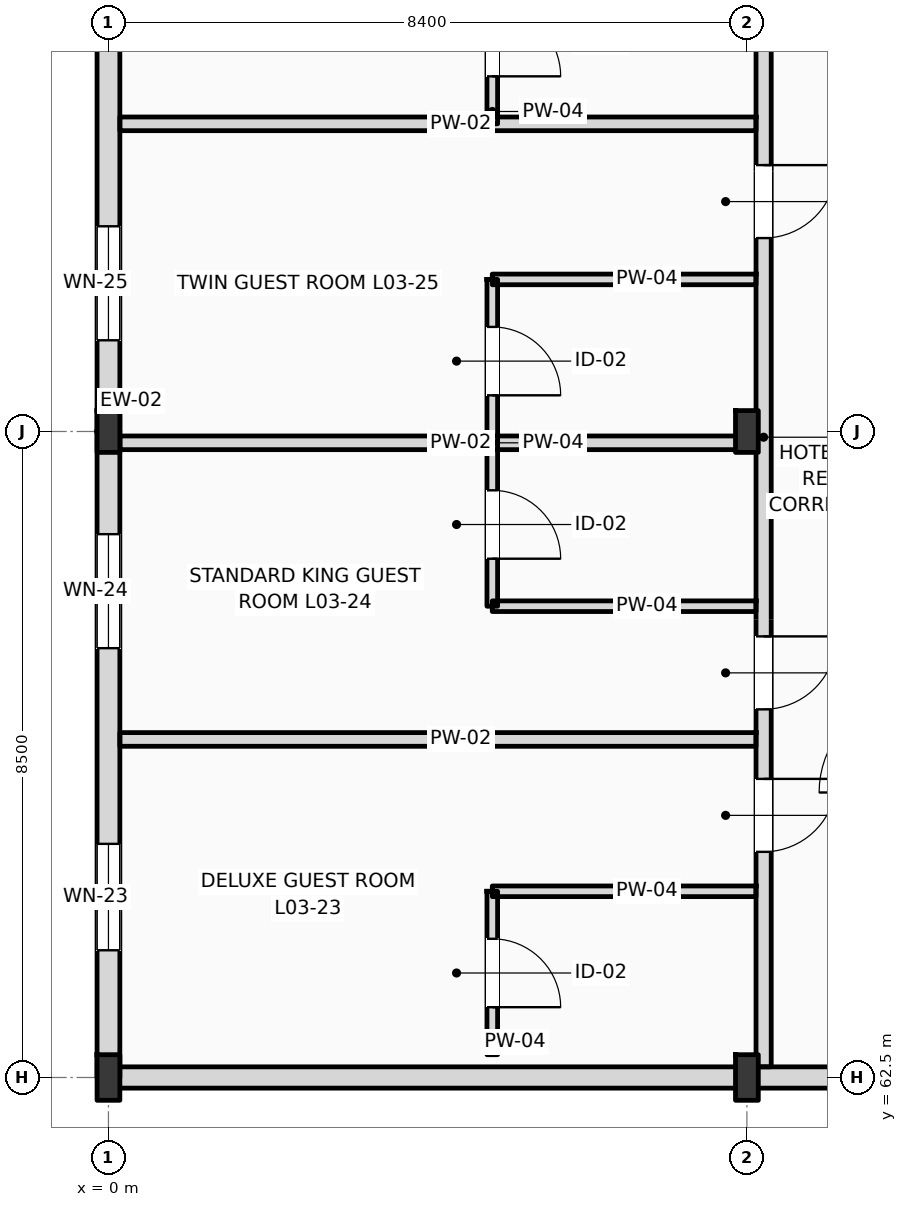
"""IFC4 building model, lengths in metres.
Left out: names, types, materials, properties, quantities, classifications, styles, units other than length and angle.
Written with IfcOpenShell. Run it as: python <this file> out.ifc"""

import sys

from ifc_helpers import new_model, si_unit, direction, frame, frame_2d, origin, origin_2d, place, context, subcontext, project, spatial, rectangle, i_section, extrude, element, fill, save


model = new_model("IFC4")
c1 = context("Model", 3, precision=1e-05, world=origin(), true_north=direction((0.0, 1.0)))
c2 = subcontext(c1, "Body", "Model", "MODEL_VIEW")
j1 = project(units=[si_unit("LENGTHUNIT", "METRE"), si_unit("PLANEANGLEUNIT", "RADIAN")], contexts=[c1])
p1 = place(None, origin())
s1 = spatial("IfcSite", under=j1, at=p1, CompositionType="ELEMENT")
p2 = place(p1, origin())
s2 = spatial("IfcBuilding", under=s1, at=p2, CompositionType="ELEMENT")
p3 = place(p2, frame((0.0, 0.0, 16.2)))
s3 = spatial("IfcBuildingStorey", under=s2, at=p3, CompositionType="ELEMENT", Elevation=16.2)
p4 = place(p3, frame((0.0, 62.5, 0.0), z_axis=(0.0, 0.0, 1.0), x_axis=(1.0, 0.0, 0.0)))
e1 = element("IfcColumn", 1, at=p4, inside=s3, PredefinedType="COLUMN", context=c2, shape_type="SweptSolid", body=[
    extrude(i_section(OverallWidth=0.3, OverallDepth=0.6, WebThickness=0.015, FlangeThickness=0.03, FilletRadius=0.027, at=origin_2d()), origin(), (0.0, 0.0, 1.0), 4.2),
])
p5 = place(p3, frame((0.0, 71.0, 0.0), z_axis=(0.0, 0.0, 1.0), x_axis=(1.0, 0.0, 0.0)))
e2 = element("IfcColumn", 2, at=p5, inside=s3, PredefinedType="COLUMN", context=c2, shape_type="SweptSolid", body=[
    extrude(i_section(OverallWidth=0.3, OverallDepth=0.55, WebThickness=0.015, FlangeThickness=0.029, FilletRadius=0.027, at=origin_2d()), origin(), (0.0, 0.0, 1.0), 4.2),
])
p6 = place(p3, frame((8.4, 62.5, 0.0), z_axis=(0.0, 0.0, 1.0), x_axis=(1.0, 0.0, 0.0)))
e3 = element("IfcColumn", 3, at=p6, inside=s3, PredefinedType="COLUMN", context=c2, shape_type="SweptSolid", body=[
    extrude(i_section(OverallWidth=0.3, OverallDepth=0.6, WebThickness=0.015, FlangeThickness=0.03, FilletRadius=0.027, at=origin_2d()), origin(), (0.0, 0.0, 1.0), 4.2),
])
p7 = place(p3, frame((8.4, 71.0, 0.0), z_axis=(0.0, 0.0, 1.0), x_axis=(1.0, 0.0, 0.0)))
e4 = element("IfcColumn", 4, at=p7, inside=s3, PredefinedType="COLUMN", context=c2, shape_type="SweptSolid", body=[
    extrude(i_section(OverallWidth=0.3, OverallDepth=0.55, WebThickness=0.015, FlangeThickness=0.029, FilletRadius=0.027, at=origin_2d()), origin(), (0.0, 0.0, 1.0), 4.2),
])
p8 = place(p3, frame((0.0, 62.5, 0.0), z_axis=(0.0, 0.0, 1.0), x_axis=(0.0, 1.0, 0.0)))
e5 = element("IfcWall", 5, at=p8, inside=s3, PredefinedType="STANDARD", context=c2, shape_type="SweptSolid", body=[
    extrude(rectangle(XDim=8.5, YDim=0.3, at=frame_2d((4.25, 0.0))), origin(), (0.0, 0.0, 1.0), 3.51),
])
p9 = place(p8, frame((1.674, 0.0, 0.9)))
e6 = element("IfcOpeningElement", 6, at=p9, cuts=e5, PredefinedType="OPENING", context=c2, shape_type="SweptSolid", body=[
    extrude(rectangle(XDim=1.4, YDim=1.7, at=frame_2d((0.7, 0.85))), frame((0.0, 0.16, 0.0), z_axis=(0.0, -1.0, 0.0), x_axis=(1.0, 0.0, 0.0)), (0.0, 0.0, 1.0), 0.32),
])
p10 = place(p8, frame((5.649, 0.0, 0.9)))
e7 = element("IfcOpeningElement", 7, at=p10, cuts=e5, PredefinedType="OPENING", context=c2, shape_type="SweptSolid", body=[
    extrude(rectangle(XDim=1.5, YDim=1.75, at=frame_2d((0.75, 0.875))), frame((0.0, 0.16, 0.0), z_axis=(0.0, -1.0, 0.0), x_axis=(1.0, 0.0, 0.0)), (0.0, 0.0, 1.0), 0.32),
])
p11 = place(p3, frame((0.0, 71.0, 0.0), z_axis=(0.0, 0.0, 1.0), x_axis=(0.0, 1.0, 0.0)))
e8 = element("IfcWall", 8, at=p11, inside=s3, PredefinedType="STANDARD", context=c2, shape_type="SweptSolid", body=[
    extrude(rectangle(XDim=8.5, YDim=0.3, at=frame_2d((4.25, 0.0))), origin(), (0.0, 0.0, 1.0), 3.51),
])
p12 = place(p11, frame((1.2, 0.0, 0.9)))
e9 = element("IfcOpeningElement", 9, at=p12, cuts=e8, PredefinedType="OPENING", context=c2, shape_type="SweptSolid", body=[
    extrude(rectangle(XDim=1.5, YDim=2.3, at=frame_2d((0.75, 1.15))), frame((0.0, 0.16, 0.0), z_axis=(0.0, -1.0, 0.0), x_axis=(1.0, 0.0, 0.0)), (0.0, 0.0, 1.0), 0.32),
])
p13 = place(p11, frame((5.25, 0.0, 0.9)))
e10 = element("IfcOpeningElement", 10, at=p13, cuts=e8, PredefinedType="OPENING", context=c2, shape_type="SweptSolid", body=[
    extrude(rectangle(XDim=1.5, YDim=2.43, at=frame_2d((0.75, 1.215))), frame((0.0, 0.16, 0.0), z_axis=(0.0, -1.0, 0.0), x_axis=(1.0, 0.0, 0.0)), (0.0, 0.0, 1.0), 0.32),
])
p14 = place(p3, frame((0.0, 62.5, 0.0), z_axis=(0.0, 0.0, 1.0), x_axis=(1.0, 0.0, 0.0)))
e11 = element("IfcWall", 11, at=p14, inside=s3, PredefinedType="STANDARD", context=c2, shape_type="SweptSolid", body=[
    extrude(rectangle(XDim=25.2, YDim=0.28, at=frame_2d((12.6, 0.0))), origin(), (0.0, 0.0, 1.0), 3.36),
])
p15 = place(p3, frame((8.62, 62.64, 0.0), z_axis=(0.0, 0.0, 1.0), x_axis=(0.0, 1.0, 0.0)))
e12 = element("IfcWall", 12, at=p15, inside=s3, PredefinedType="PARTITIONING", context=c2, shape_type="SweptSolid", body=[
    extrude(rectangle(XDim=32.66, YDim=0.2, at=frame_2d((16.33, 0.0))), origin(), (0.0, 0.0, 1.0), 3.51),
])
p16 = place(p15, frame((2.829, 0.0, 0.0)))
e13 = element("IfcOpeningElement", 13, at=p16, cuts=e12, PredefinedType="OPENING", context=c2, shape_type="SweptSolid", body=[
    extrude(rectangle(XDim=0.96, YDim=2.2, at=frame_2d((0.48, 1.1))), frame((0.0, 0.11, 0.0), z_axis=(0.0, -1.0, 0.0), x_axis=(1.0, 0.0, 0.0)), (0.0, 0.0, 1.0), 0.22),
])
p17 = place(p15, frame((4.704, 0.0, 0.0)))
e14 = element("IfcOpeningElement", 14, at=p17, cuts=e12, PredefinedType="OPENING", context=c2, shape_type="SweptSolid", body=[
    extrude(rectangle(XDim=0.96, YDim=2.2, at=frame_2d((0.48, 1.1))), frame((0.0, 0.11, 0.0), z_axis=(0.0, -1.0, 0.0), x_axis=(1.0, 0.0, 0.0)), (0.0, 0.0, 1.0), 0.22),
])
p18 = place(p15, frame((10.905, 0.0, 0.0)))
e15 = element("IfcOpeningElement", 15, at=p18, cuts=e12, PredefinedType="OPENING", context=c2, shape_type="SweptSolid", body=[
    extrude(rectangle(XDim=0.96, YDim=2.2, at=frame_2d((0.48, 1.1))), frame((0.0, 0.11, 0.0), z_axis=(0.0, -1.0, 0.0), x_axis=(1.0, 0.0, 0.0)), (0.0, 0.0, 1.0), 0.22),
])
p19 = place(p15, frame((14.954, 0.0, 0.0)))
e16 = element("IfcOpeningElement", 16, at=p19, cuts=e12, PredefinedType="OPENING", context=c2, shape_type="SweptSolid", body=[
    extrude(rectangle(XDim=0.96, YDim=2.2, at=frame_2d((0.48, 1.1))), frame((0.0, 0.11, 0.0), z_axis=(0.0, -1.0, 0.0), x_axis=(1.0, 0.0, 0.0)), (0.0, 0.0, 1.0), 0.22),
])
p20 = place(p15, frame((19.004, 0.0, 0.0)))
e17 = element("IfcOpeningElement", 17, at=p20, cuts=e12, PredefinedType="OPENING", context=c2, shape_type="SweptSolid", body=[
    extrude(rectangle(XDim=0.96, YDim=2.2, at=frame_2d((0.48, 1.1))), frame((0.0, 0.11, 0.0), z_axis=(0.0, -1.0, 0.0), x_axis=(1.0, 0.0, 0.0)), (0.0, 0.0, 1.0), 0.22),
])
p21 = place(p15, frame((23.055, 0.0, 0.0)))
e18 = element("IfcOpeningElement", 18, at=p21, cuts=e12, PredefinedType="OPENING", context=c2, shape_type="SweptSolid", body=[
    extrude(rectangle(XDim=0.96, YDim=2.2, at=frame_2d((0.48, 1.1))), frame((0.0, 0.11, 0.0), z_axis=(0.0, -1.0, 0.0), x_axis=(1.0, 0.0, 0.0)), (0.0, 0.0, 1.0), 0.22),
])
p22 = place(p15, frame((27.104, 0.0, 0.0)))
e19 = element("IfcOpeningElement", 19, at=p22, cuts=e12, PredefinedType="OPENING", context=c2, shape_type="SweptSolid", body=[
    extrude(rectangle(XDim=0.96, YDim=2.2, at=frame_2d((0.48, 1.1))), frame((0.0, 0.11, 0.0), z_axis=(0.0, -1.0, 0.0), x_axis=(1.0, 0.0, 0.0)), (0.0, 0.0, 1.0), 0.22),
])
p23 = place(p15, frame((31.179, 0.0, 0.0)))
e20 = element("IfcOpeningElement", 20, at=p23, cuts=e12, PredefinedType="OPENING", context=c2, shape_type="SweptSolid", body=[
    extrude(rectangle(XDim=0.96, YDim=2.2, at=frame_2d((0.48, 1.1))), frame((0.0, 0.11, 0.0), z_axis=(0.0, -1.0, 0.0), x_axis=(1.0, 0.0, 0.0)), (0.0, 0.0, 1.0), 0.22),
])
p24 = place(p3, frame((0.15, 66.948, 0.0), z_axis=(0.0, 0.0, 1.0), x_axis=(1.0, 0.0, 0.0)))
e21 = element("IfcWall", 21, at=p24, inside=s3, PredefinedType="PARTITIONING", context=c2, shape_type="SweptSolid", body=[
    extrude(rectangle(XDim=8.37, YDim=0.18, at=frame_2d((4.185, 0.0))), origin(), (0.0, 0.0, 1.0), 3.92),
])
p25 = place(p3, frame((5.05, 64.95, 0.0), z_axis=(0.0, 0.0, 1.0), x_axis=(1.0, 0.0, 0.0)))
e22 = element("IfcWall", 22, at=p25, inside=s3, PredefinedType="PARTITIONING", context=c2, shape_type="SweptSolid", body=[
    extrude(rectangle(XDim=3.47, YDim=0.14, at=frame_2d((1.735, 0.0))), origin(), (0.0, 0.0, 1.0), 3.92),
])
p26 = place(p3, frame((5.05, 62.8, 0.0), z_axis=(0.0, 0.0, 1.0), x_axis=(0.0, 1.0, 0.0)))
e23 = element("IfcWall", 23, at=p26, inside=s3, PredefinedType="PARTITIONING", context=c2, shape_type="SweptSolid", body=[
    extrude(rectangle(XDim=2.15, YDim=0.14, at=frame_2d((1.075, 0.0))), origin(), (0.0, 0.0, 1.0), 3.92),
])
p27 = place(p26, frame((0.625, 0.0, 0.0)))
e24 = element("IfcOpeningElement", 24, at=p27, cuts=e23, PredefinedType="OPENING", context=c2, shape_type="SweptSolid", body=[
    extrude(rectangle(XDim=0.9, YDim=2.1, at=frame_2d((0.45, 1.05))), frame((0.0, 0.08, 0.0), z_axis=(0.0, -1.0, 0.0), x_axis=(1.0, 0.0, 0.0)), (0.0, 0.0, 1.0), 0.16),
])
p28 = place(p3, frame((0.15, 70.851, 0.0), z_axis=(0.0, 0.0, 1.0), x_axis=(1.0, 0.0, 0.0)))
e25 = element("IfcWall", 25, at=p28, inside=s3, PredefinedType="PARTITIONING", context=c2, shape_type="SweptSolid", body=[
    extrude(rectangle(XDim=8.37, YDim=0.18, at=frame_2d((4.185, 0.0))), origin(), (0.0, 0.0, 1.0), 3.36),
])
p29 = place(p3, frame((5.05, 68.701, 0.0), z_axis=(0.0, 0.0, 1.0), x_axis=(1.0, 0.0, 0.0)))
e26 = element("IfcWall", 26, at=p29, inside=s3, PredefinedType="PARTITIONING", context=c2, shape_type="SweptSolid", body=[
    extrude(rectangle(XDim=3.47, YDim=0.14, at=frame_2d((1.735, 0.0))), origin(), (0.0, 0.0, 1.0), 3.92),
])
p30 = place(p3, frame((5.05, 68.701, 0.0), z_axis=(0.0, 0.0, 1.0), x_axis=(0.0, 1.0, 0.0)))
e27 = element("IfcWall", 27, at=p30, inside=s3, PredefinedType="PARTITIONING", context=c2, shape_type="SweptSolid", body=[
    extrude(rectangle(XDim=2.15, YDim=0.14, at=frame_2d((1.075, 0.0))), origin(), (0.0, 0.0, 1.0), 3.92),
])
p31 = place(p30, frame((0.625, 0.0, 0.0)))
e28 = element("IfcOpeningElement", 28, at=p31, cuts=e27, PredefinedType="OPENING", context=c2, shape_type="SweptSolid", body=[
    extrude(rectangle(XDim=0.9, YDim=2.1, at=frame_2d((0.45, 1.05))), frame((0.0, 0.08, 0.0), z_axis=(0.0, -1.0, 0.0), x_axis=(1.0, 0.0, 0.0)), (0.0, 0.0, 1.0), 0.16),
])
p32 = place(p3, frame((0.15, 75.048, 0.0), z_axis=(0.0, 0.0, 1.0), x_axis=(1.0, 0.0, 0.0)))
e29 = element("IfcWall", 29, at=p32, inside=s3, PredefinedType="PARTITIONING", context=c2, shape_type="SweptSolid", body=[
    extrude(rectangle(XDim=8.37, YDim=0.18, at=frame_2d((4.185, 0.0))), origin(), (0.0, 0.0, 1.0), 3.92),
])
p33 = place(p3, frame((5.05, 73.001, 0.0), z_axis=(0.0, 0.0, 1.0), x_axis=(1.0, 0.0, 0.0)))
e30 = element("IfcWall", 30, at=p33, inside=s3, PredefinedType="PARTITIONING", context=c2, shape_type="SweptSolid", body=[
    extrude(rectangle(XDim=3.47, YDim=0.14, at=frame_2d((1.735, 0.0))), origin(), (0.0, 0.0, 1.0), 3.92),
])
p34 = place(p3, frame((5.05, 70.851, 0.0), z_axis=(0.0, 0.0, 1.0), x_axis=(0.0, 1.0, 0.0)))
e31 = element("IfcWall", 31, at=p34, inside=s3, PredefinedType="PARTITIONING", context=c2, shape_type="SweptSolid", body=[
    extrude(rectangle(XDim=2.15, YDim=0.14, at=frame_2d((1.075, 0.0))), origin(), (0.0, 0.0, 1.0), 3.92),
])
p35 = place(p34, frame((0.625, 0.0, 0.0)))
e32 = element("IfcOpeningElement", 32, at=p35, cuts=e31, PredefinedType="OPENING", context=c2, shape_type="SweptSolid", body=[
    extrude(rectangle(XDim=0.9, YDim=2.1, at=frame_2d((0.45, 1.05))), frame((0.0, 0.08, 0.0), z_axis=(0.0, -1.0, 0.0), x_axis=(1.0, 0.0, 0.0)), (0.0, 0.0, 1.0), 0.16),
])
p36 = place(p3, frame((5.05, 75.048, 0.0), z_axis=(0.0, 0.0, 1.0), x_axis=(0.0, 1.0, 0.0)))
e33 = element("IfcWall", 33, at=p36, inside=s3, PredefinedType="PARTITIONING", context=c2, shape_type="SweptSolid", body=[
    extrude(rectangle(XDim=2.15, YDim=0.14, at=frame_2d((1.075, 0.0))), origin(), (0.0, 0.0, 1.0), 3.92),
])
p37 = place(p36, frame((0.625, 0.0, 0.0)))
e34 = element("IfcOpeningElement", 34, at=p37, cuts=e33, PredefinedType="OPENING", context=c2, shape_type="SweptSolid", body=[
    extrude(rectangle(XDim=0.9, YDim=2.1, at=frame_2d((0.45, 1.05))), frame((0.0, 0.08, 0.0), z_axis=(0.0, -1.0, 0.0), x_axis=(1.0, 0.0, 0.0)), (0.0, 0.0, 1.0), 0.16),
])
p38 = place(p9, origin())
e35 = element("IfcWindow", 35, at=p38, inside=s3, PartitioningType="DOUBLE_PANEL_VERTICAL", PredefinedType="WINDOW", context=c2, shape_type="SweptSolid", body=[
    extrude(rectangle(XDim=1.4, YDim=1.7, at=frame_2d((0.7, 0.85))), frame((0.0, 0.03, 0.0), z_axis=(0.0, -1.0, 0.0), x_axis=(1.0, 0.0, 0.0)), (0.0, 0.0, 1.0), 0.06),
])
fill(e6, e35)
p39 = place(p10, origin())
e36 = element("IfcWindow", 36, at=p39, inside=s3, PartitioningType="DOUBLE_PANEL_VERTICAL", PredefinedType="WINDOW", context=c2, shape_type="SweptSolid", body=[
    extrude(rectangle(XDim=1.5, YDim=1.75, at=frame_2d((0.75, 0.875))), frame((0.0, 0.03, 0.0), z_axis=(0.0, -1.0, 0.0), x_axis=(1.0, 0.0, 0.0)), (0.0, 0.0, 1.0), 0.06),
])
fill(e7, e36)
p40 = place(p12, origin())
e37 = element("IfcWindow", 37, at=p40, inside=s3, PartitioningType="DOUBLE_PANEL_VERTICAL", PredefinedType="WINDOW", context=c2, shape_type="SweptSolid", body=[
    extrude(rectangle(XDim=1.5, YDim=2.3, at=frame_2d((0.75, 1.15))), frame((0.0, 0.03, 0.0), z_axis=(0.0, -1.0, 0.0), x_axis=(1.0, 0.0, 0.0)), (0.0, 0.0, 1.0), 0.06),
])
fill(e9, e37)
p41 = place(p16, frame((0.96, 0.0, 0.0), z_axis=(0.0, 0.0, 1.0), x_axis=(-1.0, 0.0, 0.0)))
e38 = element("IfcDoor", 38, at=p41, inside=s3, OperationType="SINGLE_SWING_RIGHT", PredefinedType="DOOR", context=c2, shape_type="SweptSolid", body=[
    extrude(rectangle(XDim=0.96, YDim=2.2, at=frame_2d((0.48, 1.1))), frame((0.0, 0.025, 0.0), z_axis=(0.0, -1.0, 0.0), x_axis=(1.0, 0.0, 0.0)), (0.0, 0.0, 1.0), 0.05),
])
fill(e13, e38)
p42 = place(p27, frame((0.9, 0.0, 0.0), z_axis=(0.0, 0.0, 1.0), x_axis=(-1.0, 0.0, 0.0)))
e39 = element("IfcDoor", 39, at=p42, inside=s3, OperationType="SINGLE_SWING_LEFT", PredefinedType="DOOR", context=c2, shape_type="SweptSolid", body=[
    extrude(rectangle(XDim=0.9, YDim=2.1, at=frame_2d((0.45, 1.05))), frame((0.0, 0.025, 0.0), z_axis=(0.0, -1.0, 0.0), x_axis=(1.0, 0.0, 0.0)), (0.0, 0.0, 1.0), 0.05),
])
fill(e24, e39)
p43 = place(p17, frame((0.96, 0.0, 0.0), z_axis=(0.0, 0.0, 1.0), x_axis=(-1.0, 0.0, 0.0)))
e40 = element("IfcDoor", 40, at=p43, inside=s3, OperationType="SINGLE_SWING_RIGHT", PredefinedType="DOOR", context=c2, shape_type="SweptSolid", body=[
    extrude(rectangle(XDim=0.96, YDim=2.2, at=frame_2d((0.48, 1.1))), frame((0.0, 0.025, 0.0), z_axis=(0.0, -1.0, 0.0), x_axis=(1.0, 0.0, 0.0)), (0.0, 0.0, 1.0), 0.05),
])
fill(e14, e40)
p44 = place(p31, frame((0.9, 0.0, 0.0), z_axis=(0.0, 0.0, 1.0), x_axis=(-1.0, 0.0, 0.0)))
e41 = element("IfcDoor", 41, at=p44, inside=s3, OperationType="SINGLE_SWING_LEFT", PredefinedType="DOOR", context=c2, shape_type="SweptSolid", body=[
    extrude(rectangle(XDim=0.9, YDim=2.1, at=frame_2d((0.45, 1.05))), frame((0.0, 0.025, 0.0), z_axis=(0.0, -1.0, 0.0), x_axis=(1.0, 0.0, 0.0)), (0.0, 0.0, 1.0), 0.05),
])
fill(e28, e41)
p45 = place(p18, frame((0.96, 0.0, 0.0), z_axis=(0.0, 0.0, 1.0), x_axis=(-1.0, 0.0, 0.0)))
e42 = element("IfcDoor", 42, at=p45, inside=s3, OperationType="SINGLE_SWING_RIGHT", PredefinedType="DOOR", context=c2, shape_type="SweptSolid", body=[
    extrude(rectangle(XDim=0.96, YDim=2.2, at=frame_2d((0.48, 1.1))), frame((0.0, 0.025, 0.0), z_axis=(0.0, -1.0, 0.0), x_axis=(1.0, 0.0, 0.0)), (0.0, 0.0, 1.0), 0.05),
])
fill(e15, e42)
p46 = place(p35, frame((0.9, 0.0, 0.0), z_axis=(0.0, 0.0, 1.0), x_axis=(-1.0, 0.0, 0.0)))
e43 = element("IfcDoor", 43, at=p46, inside=s3, OperationType="SINGLE_SWING_LEFT", PredefinedType="DOOR", context=c2, shape_type="SweptSolid", body=[
    extrude(rectangle(XDim=0.9, YDim=2.1, at=frame_2d((0.45, 1.05))), frame((0.0, 0.025, 0.0), z_axis=(0.0, -1.0, 0.0), x_axis=(1.0, 0.0, 0.0)), (0.0, 0.0, 1.0), 0.05),
])
fill(e32, e43)
p47 = place(p37, frame((0.9, 0.0, 0.0), z_axis=(0.0, 0.0, 1.0), x_axis=(-1.0, 0.0, 0.0)))
e44 = element("IfcDoor", 44, at=p47, inside=s3, OperationType="SINGLE_SWING_LEFT", PredefinedType="DOOR", context=c2, shape_type="SweptSolid", body=[
    extrude(rectangle(XDim=0.9, YDim=2.1, at=frame_2d((0.45, 1.05))), frame((0.0, 0.025, 0.0), z_axis=(0.0, -1.0, 0.0), x_axis=(1.0, 0.0, 0.0)), (0.0, 0.0, 1.0), 0.05),
])
fill(e34, e44)
save(model, sys.argv[1])
